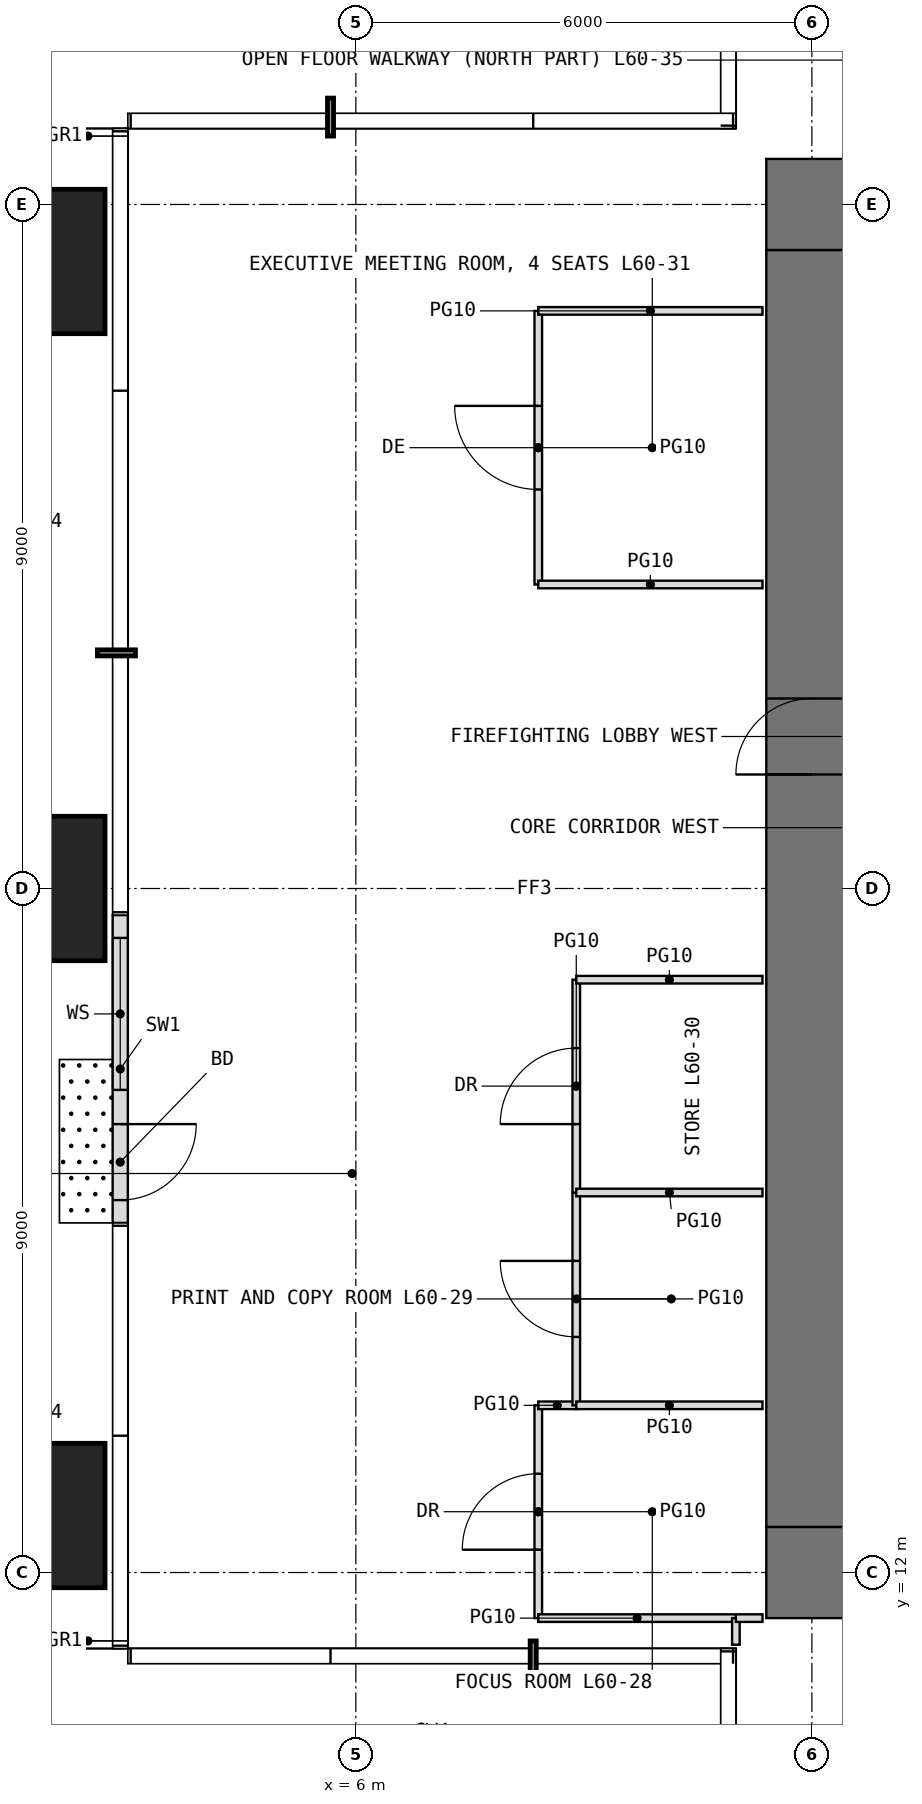
"""IFC4 building model, lengths in metres.
Left out: names, types, materials, properties, quantities, classifications, styles, units other than length and angle.
Written with IfcOpenShell. Run it as: python <this file> out.ifc"""

import sys

from ifc_helpers import new_model, si_unit, direction, frame, frame_2d, origin, origin_2d, place, context, subcontext, project, spatial, rectangle, extrude, element, fill, save


model = new_model("IFC4")
c1 = context("Model", 3, precision=1e-05, world=origin(), true_north=direction((0.0, 1.0)))
c2 = subcontext(c1, "Body", "Model", "MODEL_VIEW")
j1 = project(units=[si_unit("LENGTHUNIT", "METRE"), si_unit("PLANEANGLEUNIT", "RADIAN")], contexts=[c1])
p1 = place(None, origin())
s1 = spatial("IfcSite", under=j1, at=p1, CompositionType="ELEMENT")
p2 = place(p1, origin())
s2 = spatial("IfcBuilding", under=s1, at=p2, CompositionType="ELEMENT")
p3 = place(p2, frame((0.0, 0.0, 252.4)))
s3 = spatial("IfcBuildingStorey", under=s2, at=p3, CompositionType="ELEMENT", Elevation=252.4)
for number, where, z_axis, x_axis in (
    (1, (1.75, 12.75, 0.0), (0.0, 0.0, 1.0), (1.0, 0.0, 0.0)),
    (2, (1.75, 21.0, 0.0), (0.0, 0.0, 1.0), (1.0, 0.0, 0.0)),
    (3, (1.75, 29.25, 0.0), (0.0, 0.0, 1.0), (1.0, 0.0, 0.0)),
):
    element("IfcColumn", number, at=place(p3, frame(where, z_axis=z_axis, x_axis=x_axis)), inside=s3, PredefinedType="COLUMN", context=c2, shape_type="SweptSolid", body=[
        extrude(rectangle(XDim=1.9, YDim=1.9, at=origin_2d()), origin(), (0.0, 0.0, 1.0), 4.2),
    ])
p4 = place(p3, frame((2.9, 20.65, 0.0), z_axis=(0.0, 0.0, 1.0), x_axis=(0.0, -1.0, 0.0)))
e4 = element("IfcWall", 4, at=p4, inside=s3, PredefinedType="USERDEFINED", context=c2, shape_type="SweptSolid", body=[
    extrude(rectangle(XDim=4.05, YDim=0.2, at=frame_2d((2.025, 0.0))), origin(), (0.0, 0.0, 1.0), 3.95),
])
p5 = place(p4, frame((2.75, 0.0, 0.0)))
e5 = element("IfcOpeningElement", 5, at=p5, cuts=e4, PredefinedType="OPENING", context=c2, shape_type="SweptSolid", body=[
    extrude(rectangle(XDim=1.0, YDim=2.4, at=frame_2d((0.5, 1.2))), frame((0.0, 0.11, 0.0), z_axis=(0.0, -1.0, 0.0), x_axis=(1.0, 0.0, 0.0)), (0.0, 0.0, 1.0), 0.22),
])
p6 = place(p4, frame((0.3, 0.0, 0.3)))
e6 = element("IfcOpeningElement", 6, at=p6, cuts=e4, PredefinedType="OPENING", context=c2, shape_type="SweptSolid", body=[
    extrude(rectangle(XDim=2.0, YDim=2.7, at=frame_2d((1.0, 1.35))), frame((0.0, 0.11, 0.0), z_axis=(0.0, -1.0, 0.0), x_axis=(1.0, 0.0, 0.0)), (0.0, 0.0, 1.0), 0.22),
])
p7 = place(p3, frame((11.4, 12.0, -0.05), z_axis=(0.0, 0.0, 1.0), x_axis=(1.0, 0.0, 0.0)))
e7 = element("IfcWall", 7, at=p7, inside=s3, PredefinedType="SHEAR", context=c2, shape_type="SweptSolid", body=[
    extrude(rectangle(XDim=19.2, YDim=1.2, at=frame_2d((9.6, 0.0))), origin(), (0.0, 0.0, 1.0), 4.2),
])
p8 = place(p7, frame((8.6, 0.0, 0.05)))
e8 = element("IfcOpeningElement", 8, at=p8, cuts=e7, PredefinedType="OPENING", context=c2, shape_type="SweptSolid", body=[
    extrude(rectangle(XDim=2.0, YDim=2.2, at=frame_2d((1.0, 1.1))), frame((0.0, 0.61, 0.0), z_axis=(0.0, -1.0, 0.0), x_axis=(1.0, 0.0, 0.0)), (0.0, 0.0, 1.0), 1.22),
])
p9 = place(p3, frame((11.4, 30.0, -0.05), z_axis=(0.0, 0.0, 1.0), x_axis=(1.0, 0.0, 0.0)))
e9 = element("IfcWall", 9, at=p9, inside=s3, PredefinedType="SHEAR", context=c2, shape_type="SweptSolid", body=[
    extrude(rectangle(XDim=19.2, YDim=1.2, at=frame_2d((9.6, 0.0))), origin(), (0.0, 0.0, 1.0), 4.2),
])
p10 = place(p9, frame((8.6, 0.0, 0.05)))
e10 = element("IfcOpeningElement", 10, at=p10, cuts=e9, PredefinedType="OPENING", context=c2, shape_type="SweptSolid", body=[
    extrude(rectangle(XDim=2.0, YDim=2.2, at=frame_2d((1.0, 1.1))), frame((0.0, 0.61, 0.0), z_axis=(0.0, -1.0, 0.0), x_axis=(1.0, 0.0, 0.0)), (0.0, 0.0, 1.0), 1.22),
])
p11 = place(p3, frame((12.0, 12.6, -0.05), z_axis=(0.0, 0.0, 1.0), x_axis=(0.0, 1.0, 0.0)))
e11 = element("IfcWall", 11, at=p11, inside=s3, PredefinedType="SHEAR", context=c2, shape_type="SweptSolid", body=[
    extrude(rectangle(XDim=16.8, YDim=1.2, at=frame_2d((8.4, 0.0))), origin(), (0.0, 0.0, 1.0), 4.2),
])
p12 = place(p11, frame((9.9, 0.0, 0.05)))
e12 = element("IfcOpeningElement", 12, at=p12, cuts=e11, PredefinedType="OPENING", context=c2, shape_type="SweptSolid", body=[
    extrude(rectangle(XDim=1.0, YDim=2.2, at=frame_2d((0.5, 1.1))), frame((0.0, 0.61, 0.0), z_axis=(0.0, -1.0, 0.0), x_axis=(1.0, 0.0, 0.0)), (0.0, 0.0, 1.0), 1.22),
])
p13 = place(p3, frame((8.4, 11.4, 0.0), z_axis=(0.0, 0.0, 1.0), x_axis=(0.0, 1.0, 0.0)))
e13 = element("IfcWall", 13, at=p13, inside=s3, PredefinedType="PARTITIONING", context=c2, shape_type="SweptSolid", body=[
    extrude(rectangle(XDim=2.8, YDim=0.1, at=frame_2d((1.4, 0.0))), origin(), (0.0, 0.0, 1.0), 3.95),
])
p14 = place(p13, frame((0.9, 0.0, 0.0)))
e14 = element("IfcOpeningElement", 14, at=p14, cuts=e13, PredefinedType="OPENING", context=c2, shape_type="SweptSolid", body=[
    extrude(rectangle(XDim=1.0, YDim=2.2, at=frame_2d((0.5, 1.1))), frame((0.0, 0.06, 0.0), z_axis=(0.0, -1.0, 0.0), x_axis=(1.0, 0.0, 0.0)), (0.0, 0.0, 1.0), 0.12),
])
p15 = place(p3, frame((8.4, 11.4, 0.0), z_axis=(0.0, 0.0, 1.0), x_axis=(1.0, 0.0, 0.0)))
e15 = element("IfcWall", 15, at=p15, inside=s3, PredefinedType="PARTITIONING", context=c2, shape_type="SweptSolid", body=[
    extrude(rectangle(XDim=2.6, YDim=0.1, at=frame_2d((1.3, 0.0))), origin(), (0.0, 0.0, 1.0), 3.95),
])
p16 = place(p3, frame((8.4, 14.2, 0.0), z_axis=(0.0, 0.0, 1.0), x_axis=(1.0, 0.0, 0.0)))
e16 = element("IfcWall", 16, at=p16, inside=s3, PredefinedType="PARTITIONING", context=c2, shape_type="SweptSolid", body=[
    extrude(rectangle(XDim=0.5, YDim=0.1, at=frame_2d((0.25, 0.0))), origin(), (0.0, 0.0, 1.0), 3.95),
])
p17 = place(p3, frame((8.4, 25.0, 0.0), z_axis=(0.0, 0.0, 1.0), x_axis=(0.0, 1.0, 0.0)))
e17 = element("IfcWall", 17, at=p17, inside=s3, PredefinedType="PARTITIONING", context=c2, shape_type="SweptSolid", body=[
    extrude(rectangle(XDim=3.6, YDim=0.1, at=frame_2d((1.8, 0.0))), origin(), (0.0, 0.0, 1.0), 3.95),
])
p18 = place(p17, frame((1.25, 0.0, 0.0)))
e18 = element("IfcOpeningElement", 18, at=p18, cuts=e17, PredefinedType="OPENING", context=c2, shape_type="SweptSolid", body=[
    extrude(rectangle(XDim=1.1, YDim=2.3, at=frame_2d((0.55, 1.15))), frame((0.0, 0.06, 0.0), z_axis=(0.0, -1.0, 0.0), x_axis=(1.0, 0.0, 0.0)), (0.0, 0.0, 1.0), 0.12),
])
for number, where, z_axis, x_axis in (
    (19, (8.4, 25.0, 0.0), (0.0, 0.0, 1.0), (1.0, 0.0, 0.0)),
    (20, (8.4, 28.6, 0.0), (0.0, 0.0, 1.0), (1.0, 0.0, 0.0)),
):
    element("IfcWall", number, at=place(p3, frame(where, z_axis=z_axis, x_axis=x_axis)), inside=s3, PredefinedType="PARTITIONING", context=c2, shape_type="SweptSolid", body=[
        extrude(rectangle(XDim=2.95, YDim=0.1, at=frame_2d((1.475, 0.0))), origin(), (0.0, 0.0, 1.0), 3.95),
    ])
p19 = place(p3, frame((8.9, 14.2, 0.0), z_axis=(0.0, 0.0, 1.0), x_axis=(0.0, 1.0, 0.0)))
e21 = element("IfcWall", 21, at=p19, inside=s3, PredefinedType="PARTITIONING", context=c2, shape_type="SweptSolid", body=[
    extrude(rectangle(XDim=2.8, YDim=0.1, at=frame_2d((1.4, 0.0))), origin(), (0.0, 0.0, 1.0), 3.95),
])
p20 = place(p19, frame((0.9, 0.0, 0.0)))
e22 = element("IfcOpeningElement", 22, at=p20, cuts=e21, PredefinedType="OPENING", context=c2, shape_type="SweptSolid", body=[
    extrude(rectangle(XDim=1.0, YDim=2.2, at=frame_2d((0.5, 1.1))), frame((0.0, 0.06, 0.0), z_axis=(0.0, -1.0, 0.0), x_axis=(1.0, 0.0, 0.0)), (0.0, 0.0, 1.0), 0.12),
])
p21 = place(p3, frame((8.9, 14.2, 0.0), z_axis=(0.0, 0.0, 1.0), x_axis=(1.0, 0.0, 0.0)))
e23 = element("IfcWall", 23, at=p21, inside=s3, PredefinedType="PARTITIONING", context=c2, shape_type="SweptSolid", body=[
    extrude(rectangle(XDim=2.45, YDim=0.1, at=frame_2d((1.225, 0.0))), origin(), (0.0, 0.0, 1.0), 3.95),
])
p22 = place(p3, frame((8.9, 17.0, 0.0), z_axis=(0.0, 0.0, 1.0), x_axis=(0.0, 1.0, 0.0)))
e24 = element("IfcWall", 24, at=p22, inside=s3, PredefinedType="PARTITIONING", context=c2, shape_type="SweptSolid", body=[
    extrude(rectangle(XDim=2.8, YDim=0.1, at=frame_2d((1.4, 0.0))), origin(), (0.0, 0.0, 1.0), 3.95),
])
p23 = place(p22, frame((0.9, 0.0, 0.0)))
e25 = element("IfcOpeningElement", 25, at=p23, cuts=e24, PredefinedType="OPENING", context=c2, shape_type="SweptSolid", body=[
    extrude(rectangle(XDim=1.0, YDim=2.2, at=frame_2d((0.5, 1.1))), frame((0.0, 0.06, 0.0), z_axis=(0.0, -1.0, 0.0), x_axis=(1.0, 0.0, 0.0)), (0.0, 0.0, 1.0), 0.12),
])
for number, where, z_axis, x_axis in (
    (26, (8.9, 17.0, 0.0), (0.0, 0.0, 1.0), (1.0, 0.0, 0.0)),
    (27, (8.9, 19.8, 0.0), (0.0, 0.0, 1.0), (1.0, 0.0, 0.0)),
):
    element("IfcWall", number, at=place(p3, frame(where, z_axis=z_axis, x_axis=x_axis)), inside=s3, PredefinedType="PARTITIONING", context=c2, shape_type="SweptSolid", body=[
        extrude(rectangle(XDim=2.45, YDim=0.1, at=frame_2d((1.225, 0.0))), origin(), (0.0, 0.0, 1.0), 3.95),
    ])
p24 = place(p3, frame((11.0, 11.05, 0.0), z_axis=(0.0, 0.0, 1.0), x_axis=(0.0, 1.0, 0.0)))
e28 = element("IfcWall", 28, at=p24, inside=s3, PredefinedType="PARTITIONING", context=c2, shape_type="SweptSolid", body=[
    extrude(rectangle(XDim=0.35, YDim=0.1, at=frame_2d((0.175, 0.0))), origin(), (0.0, 0.0, 1.0), 3.95),
])
p25 = place(p3, frame((11.0, 11.4, 0.0), z_axis=(0.0, 0.0, 1.0), x_axis=(1.0, 0.0, 0.0)))
e29 = element("IfcWall", 29, at=p25, inside=s3, PredefinedType="PARTITIONING", context=c2, shape_type="SweptSolid", body=[
    extrude(rectangle(XDim=0.35, YDim=0.1, at=frame_2d((0.175, 0.0))), origin(), (0.0, 0.0, 1.0), 3.95),
])
p26 = place(p5, origin())
e30 = element("IfcDoor", 30, at=p26, inside=s3, OperationType="SINGLE_SWING_LEFT", PredefinedType="DOOR", context=c2, shape_type="SweptSolid", body=[
    extrude(rectangle(XDim=1.0, YDim=2.4, at=frame_2d((0.5, 1.2))), frame((0.0, 0.025, 0.0), z_axis=(0.0, -1.0, 0.0), x_axis=(1.0, 0.0, 0.0)), (0.0, 0.0, 1.0), 0.05),
])
fill(e5, e30)
p27 = place(p6, origin())
e31 = element("IfcWindow", 31, at=p27, inside=s3, PartitioningType="SINGLE_PANEL", PredefinedType="WINDOW", context=c2, shape_type="SweptSolid", body=[
    extrude(rectangle(XDim=2.0, YDim=2.7, at=frame_2d((1.0, 1.35))), frame((0.0, 0.03, 0.0), z_axis=(0.0, -1.0, 0.0), x_axis=(1.0, 0.0, 0.0)), (0.0, 0.0, 1.0), 0.06),
])
fill(e6, e31)
p28 = place(p12, origin())
e32 = element("IfcDoor", 32, at=p28, inside=s3, OperationType="SINGLE_SWING_LEFT", PredefinedType="DOOR", context=c2, shape_type="SweptSolid", body=[
    extrude(rectangle(XDim=1.0, YDim=2.2, at=frame_2d((0.5, 1.1))), frame((0.0, 0.025, 0.0), z_axis=(0.0, -1.0, 0.0), x_axis=(1.0, 0.0, 0.0)), (0.0, 0.0, 1.0), 0.05),
])
fill(e12, e32)
p29 = place(p14, origin())
e33 = element("IfcDoor", 33, at=p29, inside=s3, OperationType="SINGLE_SWING_LEFT", PredefinedType="DOOR", context=c2, shape_type="SweptSolid", body=[
    extrude(rectangle(XDim=1.0, YDim=2.2, at=frame_2d((0.5, 1.1))), frame((0.0, 0.025, 0.0), z_axis=(0.0, -1.0, 0.0), x_axis=(1.0, 0.0, 0.0)), (0.0, 0.0, 1.0), 0.05),
])
fill(e14, e33)
p30 = place(p20, origin())
e34 = element("IfcDoor", 34, at=p30, inside=s3, OperationType="SINGLE_SWING_RIGHT", PredefinedType="DOOR", context=c2, shape_type="SweptSolid", body=[
    extrude(rectangle(XDim=1.0, YDim=2.2, at=frame_2d((0.5, 1.1))), frame((0.0, 0.025, 0.0), z_axis=(0.0, -1.0, 0.0), x_axis=(1.0, 0.0, 0.0)), (0.0, 0.0, 1.0), 0.05),
])
fill(e22, e34)
p31 = place(p23, origin())
e35 = element("IfcDoor", 35, at=p31, inside=s3, OperationType="SINGLE_SWING_LEFT", PredefinedType="DOOR", context=c2, shape_type="SweptSolid", body=[
    extrude(rectangle(XDim=1.0, YDim=2.2, at=frame_2d((0.5, 1.1))), frame((0.0, 0.025, 0.0), z_axis=(0.0, -1.0, 0.0), x_axis=(1.0, 0.0, 0.0)), (0.0, 0.0, 1.0), 0.05),
])
fill(e25, e35)
p32 = place(p18, origin())
e36 = element("IfcDoor", 36, at=p32, inside=s3, OperationType="SINGLE_SWING_RIGHT", PredefinedType="DOOR", context=c2, shape_type="SweptSolid", body=[
    extrude(rectangle(XDim=1.1, YDim=2.3, at=frame_2d((0.55, 1.15))), frame((0.0, 0.025, 0.0), z_axis=(0.0, -1.0, 0.0), x_axis=(1.0, 0.0, 0.0)), (0.0, 0.0, 1.0), 0.05),
])
fill(e18, e36)
save(model, sys.argv[1])
